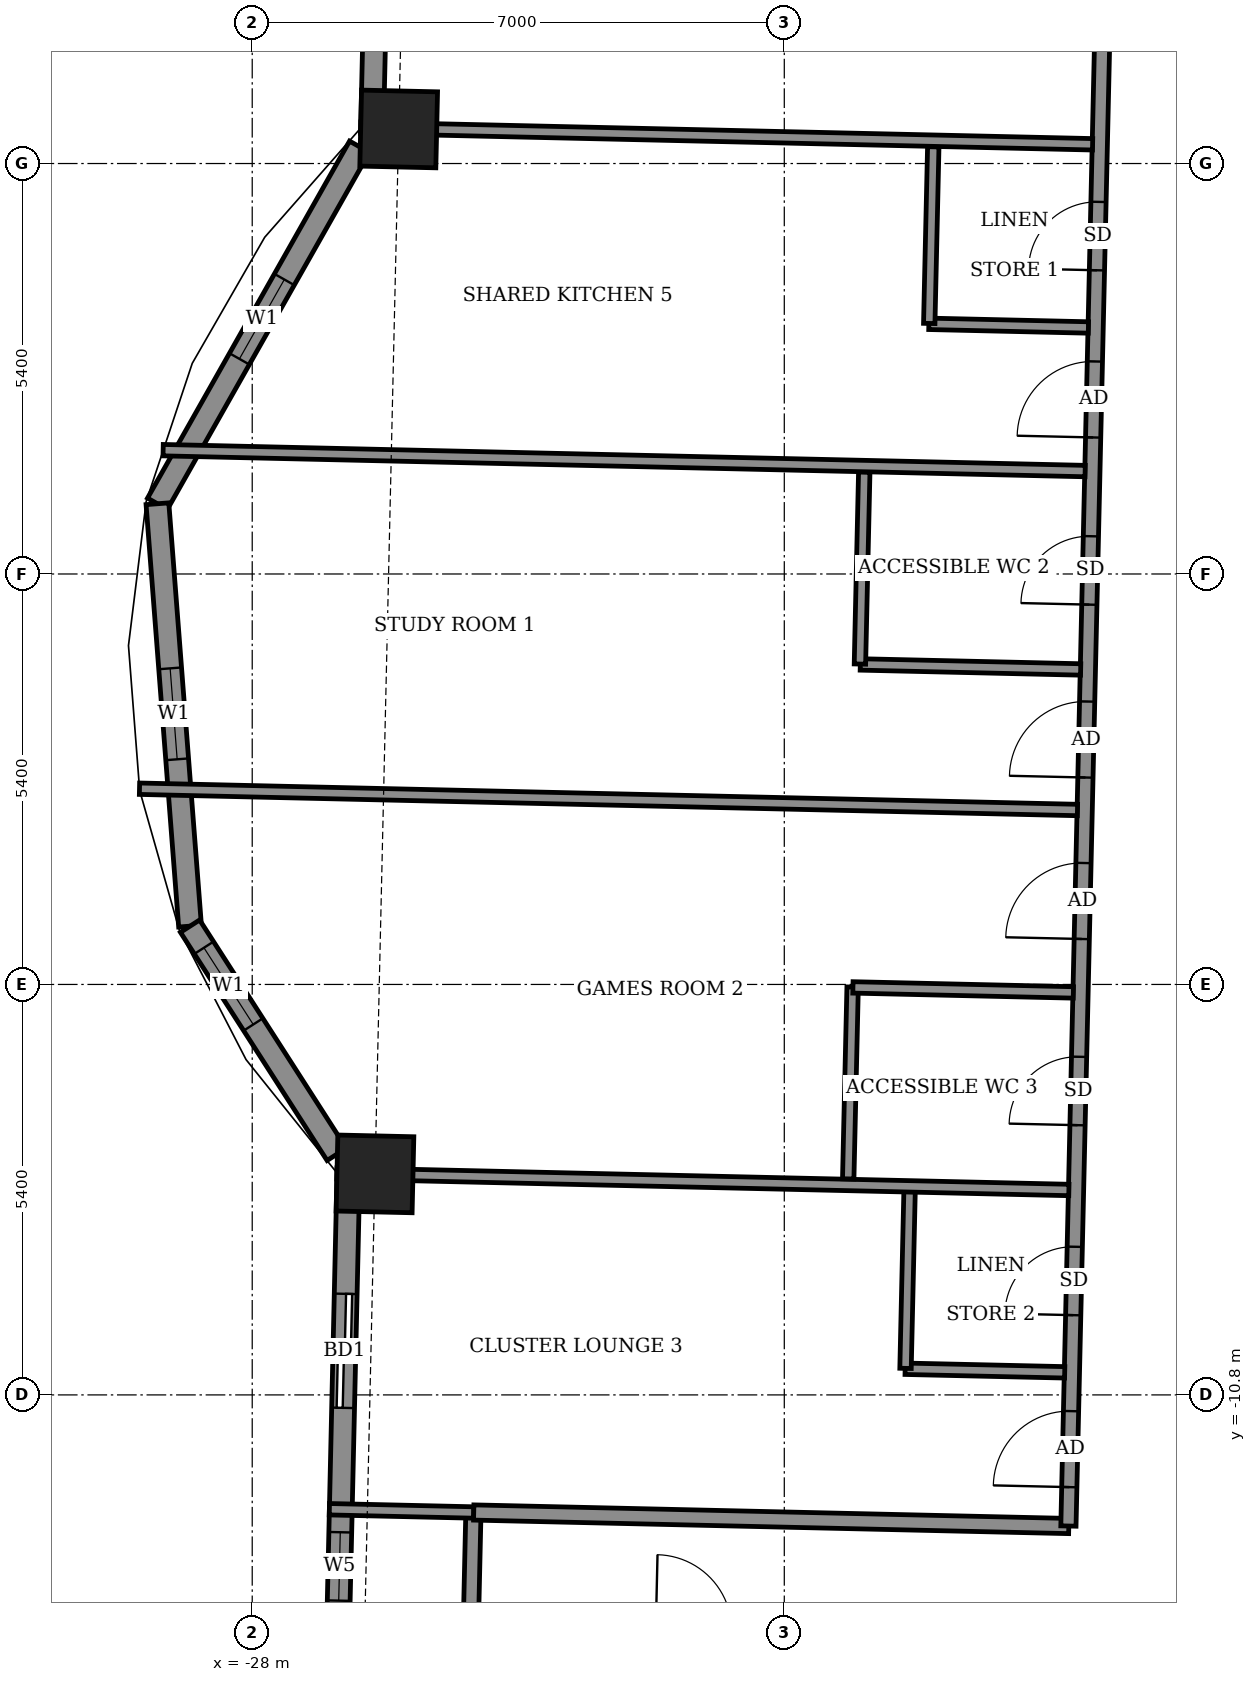
"""IFC4 building model, lengths in metres.
Left out: names, types, materials, properties, quantities, classifications, styles, units other than length and angle.
Written with IfcOpenShell. Run it as: python <this file> out.ifc"""

import sys

from ifc_helpers import new_model, si_unit, direction, frame, frame_2d, origin, origin_2d, place, context, subcontext, project, spatial, rectangle, extrude, element, fill, save


model = new_model("IFC4")
c1 = context("Model", 3, precision=1e-05, world=origin(), true_north=direction((0.0, 1.0)))
c2 = subcontext(c1, "Body", "Model", "MODEL_VIEW")
j1 = project(units=[si_unit("LENGTHUNIT", "METRE"), si_unit("PLANEANGLEUNIT", "RADIAN")], contexts=[c1])
p1 = place(None, origin())
s1 = spatial("IfcSite", under=j1, at=p1, CompositionType="ELEMENT")
p2 = place(p1, origin())
s2 = spatial("IfcBuilding", under=s1, at=p2, CompositionType="ELEMENT")
p3 = place(p2, frame((0.0, 0.0, 271.7)))
s3 = spatial("IfcBuildingStorey", under=s2, at=p3, CompositionType="ELEMENT", Elevation=271.7)
for number, where, z_axis, x_axis in (
    (1, (-26.385, -7.892, -0.55), (0.0, 0.0, 1.0), (-0.023, -1.0, 0.0)),
    (2, (-26.073, 5.855, -0.55), (0.0, 0.0, 1.0), (-0.023, -1.0, 0.0)),
):
    element("IfcColumn", number, at=place(p3, frame(where, z_axis=z_axis, x_axis=x_axis)), inside=s3, PredefinedType="COLUMN", context=c2, shape_type="SweptSolid", body=[
        extrude(rectangle(XDim=1.0, YDim=1.0, at=origin_2d()), origin(), (0.0, 0.0, 1.0), 3.6),
    ])
p4 = place(p3, frame((-26.108, 19.732, 0.0), z_axis=(0.0, 0.0, 1.0), x_axis=(-0.022700699365, -0.999742305921, 0.0)))
e3 = element("IfcWall", 3, at=p4, inside=s3, PredefinedType="SOLIDWALL", context=c2, shape_type="SweptSolid", body=[
    extrude(rectangle(XDim=13.927, YDim=0.3, at=frame_2d((6.964, 0.0))), origin(), (0.0, 0.0, 1.0), 2.55),
])
p5 = place(p4, frame((2.933, 0.0, 0.0)))
e4 = element("IfcOpeningElement", 4, at=p5, cuts=e3, PredefinedType="OPENING", context=c2, shape_type="SweptSolid", body=[
    extrude(rectangle(XDim=1.5, YDim=2.4, at=frame_2d((0.75, 1.2))), frame((0.0, 0.16, 0.0), z_axis=(0.0, -1.0, 0.0), x_axis=(1.0, 0.0, 0.0)), (0.0, 0.0, 1.0), 0.32),
])
p6 = place(p4, frame((9.216, 0.0, 0.9)))
e5 = element("IfcOpeningElement", 5, at=p6, cuts=e3, PredefinedType="OPENING", context=c2, shape_type="SweptSolid", body=[
    extrude(rectangle(XDim=2.4, YDim=1.5, at=frame_2d((1.2, 0.75))), frame((0.0, 0.16, 0.0), z_axis=(0.0, -1.0, 0.0), x_axis=(1.0, 0.0, 0.0)), (0.0, 0.0, 1.0), 0.32),
])
p7 = place(p3, frame((-26.589, 5.621, 0.0), z_axis=(0.0, 0.0, 1.0), x_axis=(-0.492495436053, -0.870315026566, 0.0)))
e6 = element("IfcWall", 6, at=p7, inside=s3, PredefinedType="SOLIDWALL", context=c2, shape_type="SweptSolid", body=[
    extrude(rectangle(XDim=5.397, YDim=0.3, at=frame_2d((2.698, 0.0))), origin(), (0.0, 0.0, 1.0), 3.05),
])
p8 = place(p7, frame((2.007, 0.0, 0.9)))
e7 = element("IfcOpeningElement", 7, at=p8, cuts=e6, PredefinedType="OPENING", context=c2, shape_type="SweptSolid", body=[
    extrude(rectangle(XDim=1.2, YDim=1.5, at=frame_2d((0.6, 0.75))), frame((0.0, 0.16, 0.0), z_axis=(0.0, -1.0, 0.0), x_axis=(1.0, 0.0, 0.0)), (0.0, 0.0, 1.0), 0.32),
])
p9 = place(p3, frame((-29.247, 0.924, 0.0), z_axis=(0.0, 0.0, 1.0), x_axis=(0.076961115238, -0.997034095075, 0.0)))
e8 = element("IfcWall", 8, at=p9, inside=s3, PredefinedType="SOLIDWALL", context=c2, shape_type="SweptSolid", body=[
    extrude(rectangle(XDim=5.574, YDim=0.3, at=frame_2d((2.787, 0.0))), origin(), (0.0, 0.0, 1.0), 3.05),
])
p10 = place(p9, frame((2.172, 0.0, 0.9)))
e9 = element("IfcOpeningElement", 9, at=p10, cuts=e8, PredefinedType="OPENING", context=c2, shape_type="SweptSolid", body=[
    extrude(rectangle(XDim=1.2, YDim=1.5, at=frame_2d((0.6, 0.75))), frame((0.0, 0.16, 0.0), z_axis=(0.0, -1.0, 0.0), x_axis=(1.0, 0.0, 0.0)), (0.0, 0.0, 1.0), 0.32),
])
p11 = place(p3, frame((-28.818, -4.633, 0.0), z_axis=(0.0, 0.0, 1.0), x_axis=(0.540633100578, -0.841258492117, 0.0)))
e10 = element("IfcWall", 10, at=p11, inside=s3, PredefinedType="SOLIDWALL", context=c2, shape_type="SweptSolid", body=[
    extrude(rectangle(XDim=3.568, YDim=0.3, at=frame_2d((1.784, 0.0))), origin(), (0.0, 0.0, 1.0), 3.05),
])
p12 = place(p11, frame((0.338, 0.0, 0.9)))
e11 = element("IfcOpeningElement", 11, at=p12, cuts=e10, PredefinedType="OPENING", context=c2, shape_type="SweptSolid", body=[
    extrude(rectangle(XDim=1.2, YDim=1.5, at=frame_2d((0.6, 0.75))), frame((0.0, 0.16, 0.0), z_axis=(0.0, -1.0, 0.0), x_axis=(1.0, 0.0, 0.0)), (0.0, 0.0, 1.0), 0.32),
])
p13 = place(p3, frame((-26.733, -7.829, 0.0), z_axis=(0.0, 0.0, 1.0), x_axis=(-0.022721405353, -0.999741835545, 0.0)))
e12 = element("IfcWall", 12, at=p13, inside=s3, PredefinedType="SOLIDWALL", context=c2, shape_type="SweptSolid", body=[
    extrude(rectangle(XDim=14.13, YDim=0.3, at=frame_2d((7.065, 0.0))), origin(), (0.0, 0.0, 1.0), 2.55),
])
p14 = place(p13, frame((1.642, 0.0, 0.0)))
e13 = element("IfcOpeningElement", 13, at=p14, cuts=e12, PredefinedType="OPENING", context=c2, shape_type="SweptSolid", body=[
    extrude(rectangle(XDim=1.5, YDim=2.4, at=frame_2d((0.75, 1.2))), frame((0.0, 0.16, 0.0), z_axis=(0.0, -1.0, 0.0), x_axis=(1.0, 0.0, 0.0)), (0.0, 0.0, 1.0), 0.32),
])
p15 = place(p13, frame((4.779, 0.0, 0.9)))
e14 = element("IfcOpeningElement", 14, at=p15, cuts=e12, PredefinedType="OPENING", context=c2, shape_type="SweptSolid", body=[
    extrude(rectangle(XDim=0.9, YDim=1.5, at=frame_2d((0.45, 0.75))), frame((0.0, 0.16, 0.0), z_axis=(0.0, -1.0, 0.0), x_axis=(1.0, 0.0, 0.0)), (0.0, 0.0, 1.0), 0.32),
])
p16 = place(p13, frame((9.304, 0.0, 0.9)))
e15 = element("IfcOpeningElement", 15, at=p16, cuts=e12, PredefinedType="OPENING", context=c2, shape_type="SweptSolid", body=[
    extrude(rectangle(XDim=2.4, YDim=1.5, at=frame_2d((1.2, 0.75))), frame((0.0, 0.16, 0.0), z_axis=(0.0, -1.0, 0.0), x_axis=(1.0, 0.0, 0.0)), (0.0, 0.0, 1.0), 0.32),
])
p17 = place(p3, frame((-25.124, -13.847, 0.0), z_axis=(0.0, 0.0, 1.0), x_axis=(0.022617910375, 0.999744182344, 0.0)))
e16 = element("IfcWall", 16, at=p17, inside=s3, PredefinedType="PARTITIONING", context=c2, shape_type="SweptSolid", body=[
    extrude(rectangle(XDim=1.5, YDim=0.2, at=frame_2d((0.75, 0.0))), origin(), (0.0, 0.0, 1.0), 3.05),
])
p18 = place(p3, frame((-26.985, -12.304, 0.0), z_axis=(0.0, 0.0, 1.0), x_axis=(0.999744152544, -0.022619227516, 0.0)))
e17 = element("IfcWall", 17, at=p18, inside=s3, PredefinedType="PARTITIONING", context=c2, shape_type="SweptSolid", body=[
    extrude(rectangle(XDim=1.9, YDim=0.15, at=frame_2d((0.95, 0.0))), origin(), (0.0, 0.0, 1.0), 2.5),
])
p19 = place(p3, frame((-25.086, -12.347, 0.0), z_axis=(0.0, 0.0, 1.0), x_axis=(0.999741690667, -0.022727779103, 0.0)))
e18 = element("IfcWall", 18, at=p19, inside=s3, PredefinedType="PARTITIONING", context=c2, shape_type="SweptSolid", body=[
    extrude(rectangle(XDim=7.831, YDim=0.2, at=frame_2d((3.916, 0.0))), origin(), (0.0, 0.0, 1.0), 3.05),
])
p20 = place(p3, frame((-17.262, -12.525, 0.0), z_axis=(0.0, 0.0, 1.0), x_axis=(0.022706151961, 0.999742182097, 0.0)))
e19 = element("IfcWall", 19, at=p20, inside=s3, PredefinedType="PARTITIONING", context=c2, shape_type="SweptSolid", body=[
    extrude(rectangle(XDim=25.45, YDim=0.2, at=frame_2d((12.725, 0.0))), origin(), (0.0, 0.0, 1.0), 3.05),
])
p21 = place(p20, frame((19.913, 0.0, 0.0)))
e20 = element("IfcOpeningElement", 20, at=p21, cuts=e19, PredefinedType="OPENING", context=c2, shape_type="SweptSolid", body=[
    extrude(rectangle(XDim=1.0, YDim=2.1, at=frame_2d((0.5, 1.05))), frame((0.0, 0.11, 0.0), z_axis=(0.0, -1.0, 0.0), x_axis=(1.0, 0.0, 0.0)), (0.0, 0.0, 1.0), 0.22),
])
p22 = place(p20, frame((23.6, 0.0, 0.0)))
e21 = element("IfcOpeningElement", 21, at=p22, cuts=e19, PredefinedType="OPENING", context=c2, shape_type="SweptSolid", body=[
    extrude(rectangle(XDim=0.9, YDim=2.1, at=frame_2d((0.45, 1.05))), frame((0.0, 0.11, 0.0), z_axis=(0.0, -1.0, 0.0), x_axis=(1.0, 0.0, 0.0)), (0.0, 0.0, 1.0), 0.22),
])
p23 = place(p20, frame((14.325, 0.0, 0.0)))
e22 = element("IfcOpeningElement", 22, at=p23, cuts=e19, PredefinedType="OPENING", context=c2, shape_type="SweptSolid", body=[
    extrude(rectangle(XDim=1.0, YDim=2.1, at=frame_2d((0.5, 1.05))), frame((0.0, 0.11, 0.0), z_axis=(0.0, -1.0, 0.0), x_axis=(1.0, 0.0, 0.0)), (0.0, 0.0, 1.0), 0.22),
])
p24 = place(p20, frame((16.525, 0.0, 0.0)))
e23 = element("IfcOpeningElement", 23, at=p24, cuts=e19, PredefinedType="OPENING", context=c2, shape_type="SweptSolid", body=[
    extrude(rectangle(XDim=0.9, YDim=2.1, at=frame_2d((0.45, 1.05))), frame((0.0, 0.11, 0.0), z_axis=(0.0, -1.0, 0.0), x_axis=(1.0, 0.0, 0.0)), (0.0, 0.0, 1.0), 0.22),
])
p25 = place(p20, frame((9.85, 0.0, 0.0)))
e24 = element("IfcOpeningElement", 24, at=p25, cuts=e19, PredefinedType="OPENING", context=c2, shape_type="SweptSolid", body=[
    extrude(rectangle(XDim=1.0, YDim=2.1, at=frame_2d((0.5, 1.05))), frame((0.0, 0.11, 0.0), z_axis=(0.0, -1.0, 0.0), x_axis=(1.0, 0.0, 0.0)), (0.0, 0.0, 1.0), 0.22),
])
p26 = place(p20, frame((12.125, 0.0, 0.0)))
e25 = element("IfcOpeningElement", 25, at=p26, cuts=e19, PredefinedType="OPENING", context=c2, shape_type="SweptSolid", body=[
    extrude(rectangle(XDim=0.9, YDim=2.1, at=frame_2d((0.45, 1.05))), frame((0.0, 0.11, 0.0), z_axis=(0.0, -1.0, 0.0), x_axis=(1.0, 0.0, 0.0)), (0.0, 0.0, 1.0), 0.22),
])
p27 = place(p20, frame((7.725, 0.0, 0.0)))
e26 = element("IfcOpeningElement", 26, at=p27, cuts=e19, PredefinedType="OPENING", context=c2, shape_type="SweptSolid", body=[
    extrude(rectangle(XDim=1.0, YDim=2.1, at=frame_2d((0.5, 1.05))), frame((0.0, 0.11, 0.0), z_axis=(0.0, -1.0, 0.0), x_axis=(1.0, 0.0, 0.0)), (0.0, 0.0, 1.0), 0.22),
])
p28 = place(p20, frame((5.275, 0.0, 0.0)))
e27 = element("IfcOpeningElement", 27, at=p28, cuts=e19, PredefinedType="OPENING", context=c2, shape_type="SweptSolid", body=[
    extrude(rectangle(XDim=0.9, YDim=2.1, at=frame_2d((0.45, 1.05))), frame((0.0, 0.11, 0.0), z_axis=(0.0, -1.0, 0.0), x_axis=(1.0, 0.0, 0.0)), (0.0, 0.0, 1.0), 0.22),
])
p29 = place(p20, frame((0.512, 0.0, 0.0)))
e28 = element("IfcOpeningElement", 28, at=p29, cuts=e19, PredefinedType="OPENING", context=c2, shape_type="SweptSolid", body=[
    extrude(rectangle(XDim=1.0, YDim=2.1, at=frame_2d((0.5, 1.05))), frame((0.0, 0.11, 0.0), z_axis=(0.0, -1.0, 0.0), x_axis=(1.0, 0.0, 0.0)), (0.0, 0.0, 1.0), 0.22),
])
p30 = place(p20, frame((2.775, 0.0, 0.0)))
e29 = element("IfcOpeningElement", 29, at=p30, cuts=e19, PredefinedType="OPENING", context=c2, shape_type="SweptSolid", body=[
    extrude(rectangle(XDim=0.9, YDim=2.1, at=frame_2d((0.45, 1.05))), frame((0.0, 0.11, 0.0), z_axis=(0.0, -1.0, 0.0), x_axis=(1.0, 0.0, 0.0)), (0.0, 0.0, 1.0), 0.22),
])
p31 = place(p3, frame((-19.41, -10.456, 0.0), z_axis=(0.0, 0.0, 1.0), x_axis=(0.999750703499, -0.022327804475, 0.0)))
e30 = element("IfcWall", 30, at=p31, inside=s3, PredefinedType="PARTITIONING", context=c2, shape_type="SweptSolid", body=[
    extrude(rectangle(XDim=2.099, YDim=0.15, at=frame_2d((1.05, 0.0))), origin(), (0.0, 0.0, 1.0), 3.05),
])
p32 = place(p3, frame((-19.405, -10.451, 0.0), z_axis=(0.0, 0.0, 1.0), x_axis=(0.022781023197, 0.999740478815, 0.0)))
e31 = element("IfcWall", 31, at=p32, inside=s3, PredefinedType="PARTITIONING", context=c2, shape_type="SweptSolid", body=[
    extrude(rectangle(XDim=2.325, YDim=0.15, at=frame_2d((1.163, 0.0))), origin(), (0.0, 0.0, 1.0), 3.05),
])
p33 = place(p3, frame((-26.885, -7.885, 0.0), z_axis=(0.0, 0.0, 1.0), x_axis=(0.999741468995, -0.022737527832, 0.0)))
e32 = element("IfcWall", 32, at=p33, inside=s3, PredefinedType="PARTITIONING", context=c2, shape_type="SweptSolid", body=[
    extrude(rectangle(XDim=9.631, YDim=0.15, at=frame_2d((4.816, 0.0))), origin(), (0.0, 0.0, 1.0), 3.05),
])
p34 = place(p3, frame((-20.159, -7.958, 0.0), z_axis=(0.0, 0.0, 1.0), x_axis=(0.022919108675, 0.999737322729, 0.0)))
e33 = element("IfcWall", 33, at=p34, inside=s3, PredefinedType="PARTITIONING", context=c2, shape_type="SweptSolid", body=[
    extrude(rectangle(XDim=2.525, YDim=0.15, at=frame_2d((1.262, 0.0))), origin(), (0.0, 0.0, 1.0), 3.05),
])
p35 = place(p3, frame((-20.097, -5.439, 0.0), z_axis=(0.0, 0.0, 1.0), x_axis=(0.999741748633, -0.022725229174, 0.0)))
e34 = element("IfcWall", 34, at=p35, inside=s3, PredefinedType="PARTITIONING", context=c2, shape_type="SweptSolid", body=[
    extrude(rectangle(XDim=2.901, YDim=0.15, at=frame_2d((1.45, 0.0))), origin(), (0.0, 0.0, 1.0), 3.05),
])
p36 = place(p3, frame((-29.483, -2.825, 0.0), z_axis=(0.0, 0.0, 1.0), x_axis=(0.999742611035, -0.022687258129, 0.0)))
e35 = element("IfcWall", 35, at=p36, inside=s3, PredefinedType="PARTITIONING", context=c2, shape_type="SweptSolid", body=[
    extrude(rectangle(XDim=12.343, YDim=0.15, at=frame_2d((6.171, 0.0))), origin(), (0.0, 0.0, 1.0), 2.05),
])
p37 = place(p3, frame((-20.0, -1.19, 0.0), z_axis=(0.0, 0.0, 1.0), x_axis=(0.999739657619, -0.022817032779, 0.0)))
e36 = element("IfcWall", 36, at=p37, inside=s3, PredefinedType="PARTITIONING", context=c2, shape_type="SweptSolid", body=[
    extrude(rectangle(XDim=2.9, YDim=0.15, at=frame_2d((1.45, 0.0))), origin(), (0.0, 0.0, 1.0), 3.05),
])
p38 = place(p3, frame((-20.005, -1.185, 0.0), z_axis=(0.0, 0.0, 1.0), x_axis=(0.022521599255, 0.999746356616, 0.0)))
e37 = element("IfcWall", 37, at=p38, inside=s3, PredefinedType="PARTITIONING", context=c2, shape_type="SweptSolid", body=[
    extrude(rectangle(XDim=2.526, YDim=0.15, at=frame_2d((1.263, 0.0))), origin(), (0.0, 0.0, 1.0), 3.05),
])
p39 = place(p3, frame((-29.172, 1.629, 0.0), z_axis=(0.0, 0.0, 1.0), x_axis=(0.999743298181, -0.02265695791, 0.0)))
e38 = element("IfcWall", 38, at=p39, inside=s3, PredefinedType="PARTITIONING", context=c2, shape_type="SweptSolid", body=[
    extrude(rectangle(XDim=12.133, YDim=0.15, at=frame_2d((6.067, 0.0))), origin(), (0.0, 0.0, 1.0), 2.05),
])
p40 = place(p3, frame((-19.098, 3.291, 0.0), z_axis=(0.0, 0.0, 1.0), x_axis=(0.999737555419, -0.022908956429, 0.0)))
e39 = element("IfcWall", 39, at=p40, inside=s3, PredefinedType="PARTITIONING", context=c2, shape_type="SweptSolid", body=[
    extrude(rectangle(XDim=2.099, YDim=0.15, at=frame_2d((1.05, 0.0))), origin(), (0.0, 0.0, 1.0), 3.05),
])
p41 = place(p3, frame((-19.093, 3.296, 0.0), z_axis=(0.0, 0.0, 1.0), x_axis=(0.022788198363, 0.99974031529, 0.0)))
e40 = element("IfcWall", 40, at=p41, inside=s3, PredefinedType="PARTITIONING", context=c2, shape_type="SweptSolid", body=[
    extrude(rectangle(XDim=2.325, YDim=0.15, at=frame_2d((1.162, 0.0))), origin(), (0.0, 0.0, 1.0), 3.05),
])
p42 = place(p3, frame((-26.573, 5.871, 0.0), z_axis=(0.0, 0.0, 1.0), x_axis=(0.999743768709, -0.022636186244, 0.0)))
e41 = element("IfcWall", 41, at=p42, inside=s3, PredefinedType="PARTITIONING", context=c2, shape_type="SweptSolid", body=[
    extrude(rectangle(XDim=9.631, YDim=0.15, at=frame_2d((4.816, 0.0))), origin(), (0.0, 0.0, 1.0), 3.05),
])
p43 = place(p8, origin())
e42 = element("IfcWindow", 42, at=p43, inside=s3, PartitioningType="SINGLE_PANEL", PredefinedType="WINDOW", context=c2, shape_type="SweptSolid", body=[
    extrude(rectangle(XDim=1.2, YDim=1.5, at=frame_2d((0.6, 0.75))), frame((0.0, 0.03, 0.0), z_axis=(0.0, -1.0, 0.0), x_axis=(1.0, 0.0, 0.0)), (0.0, 0.0, 1.0), 0.06),
])
fill(e7, e42)
p44 = place(p10, origin())
e43 = element("IfcWindow", 43, at=p44, inside=s3, PartitioningType="SINGLE_PANEL", PredefinedType="WINDOW", context=c2, shape_type="SweptSolid", body=[
    extrude(rectangle(XDim=1.2, YDim=1.5, at=frame_2d((0.6, 0.75))), frame((0.0, 0.03, 0.0), z_axis=(0.0, -1.0, 0.0), x_axis=(1.0, 0.0, 0.0)), (0.0, 0.0, 1.0), 0.06),
])
fill(e9, e43)
p45 = place(p12, origin())
e44 = element("IfcWindow", 44, at=p45, inside=s3, PartitioningType="SINGLE_PANEL", PredefinedType="WINDOW", context=c2, shape_type="SweptSolid", body=[
    extrude(rectangle(XDim=1.2, YDim=1.5, at=frame_2d((0.6, 0.75))), frame((0.0, 0.03, 0.0), z_axis=(0.0, -1.0, 0.0), x_axis=(1.0, 0.0, 0.0)), (0.0, 0.0, 1.0), 0.06),
])
fill(e11, e44)
p46 = place(p14, origin())
e45 = element("IfcDoor", 45, at=p46, inside=s3, OperationType="SLIDING_TO_LEFT", PredefinedType="DOOR", context=c2, shape_type="SweptSolid", body=[
    extrude(rectangle(XDim=1.5, YDim=2.4, at=frame_2d((0.75, 1.2))), frame((0.0, 0.025, 0.0), z_axis=(0.0, -1.0, 0.0), x_axis=(1.0, 0.0, 0.0)), (0.0, 0.0, 1.0), 0.05),
])
fill(e13, e45)
p47 = place(p15, origin())
e46 = element("IfcWindow", 46, at=p47, inside=s3, PartitioningType="SINGLE_PANEL", PredefinedType="WINDOW", context=c2, shape_type="SweptSolid", body=[
    extrude(rectangle(XDim=0.9, YDim=1.5, at=frame_2d((0.45, 0.75))), frame((0.0, 0.03, 0.0), z_axis=(0.0, -1.0, 0.0), x_axis=(1.0, 0.0, 0.0)), (0.0, 0.0, 1.0), 0.06),
])
fill(e14, e46)
p48 = place(p23, origin())
e47 = element("IfcDoor", 47, at=p48, inside=s3, OperationType="SINGLE_SWING_RIGHT", PredefinedType="DOOR", context=c2, shape_type="SweptSolid", body=[
    extrude(rectangle(XDim=1.0, YDim=2.1, at=frame_2d((0.5, 1.05))), frame((0.0, 0.025, 0.0), z_axis=(0.0, -1.0, 0.0), x_axis=(1.0, 0.0, 0.0)), (0.0, 0.0, 1.0), 0.05),
])
fill(e22, e47)
p49 = place(p24, origin())
e48 = element("IfcDoor", 48, at=p49, inside=s3, OperationType="SINGLE_SWING_RIGHT", PredefinedType="DOOR", context=c2, shape_type="SweptSolid", body=[
    extrude(rectangle(XDim=0.9, YDim=2.1, at=frame_2d((0.45, 1.05))), frame((0.0, 0.025, 0.0), z_axis=(0.0, -1.0, 0.0), x_axis=(1.0, 0.0, 0.0)), (0.0, 0.0, 1.0), 0.05),
])
fill(e23, e48)
p50 = place(p25, origin())
e49 = element("IfcDoor", 49, at=p50, inside=s3, OperationType="SINGLE_SWING_LEFT", PredefinedType="DOOR", context=c2, shape_type="SweptSolid", body=[
    extrude(rectangle(XDim=1.0, YDim=2.1, at=frame_2d((0.5, 1.05))), frame((0.0, 0.025, 0.0), z_axis=(0.0, -1.0, 0.0), x_axis=(1.0, 0.0, 0.0)), (0.0, 0.0, 1.0), 0.05),
])
fill(e24, e49)
p51 = place(p26, origin())
e50 = element("IfcDoor", 50, at=p51, inside=s3, OperationType="SINGLE_SWING_LEFT", PredefinedType="DOOR", context=c2, shape_type="SweptSolid", body=[
    extrude(rectangle(XDim=0.9, YDim=2.1, at=frame_2d((0.45, 1.05))), frame((0.0, 0.025, 0.0), z_axis=(0.0, -1.0, 0.0), x_axis=(1.0, 0.0, 0.0)), (0.0, 0.0, 1.0), 0.05),
])
fill(e25, e50)
p52 = place(p27, origin())
e51 = element("IfcDoor", 51, at=p52, inside=s3, OperationType="SINGLE_SWING_RIGHT", PredefinedType="DOOR", context=c2, shape_type="SweptSolid", body=[
    extrude(rectangle(XDim=1.0, YDim=2.1, at=frame_2d((0.5, 1.05))), frame((0.0, 0.025, 0.0), z_axis=(0.0, -1.0, 0.0), x_axis=(1.0, 0.0, 0.0)), (0.0, 0.0, 1.0), 0.05),
])
fill(e26, e51)
p53 = place(p28, origin())
e52 = element("IfcDoor", 52, at=p53, inside=s3, OperationType="SINGLE_SWING_RIGHT", PredefinedType="DOOR", context=c2, shape_type="SweptSolid", body=[
    extrude(rectangle(XDim=0.9, YDim=2.1, at=frame_2d((0.45, 1.05))), frame((0.0, 0.025, 0.0), z_axis=(0.0, -1.0, 0.0), x_axis=(1.0, 0.0, 0.0)), (0.0, 0.0, 1.0), 0.05),
])
fill(e27, e52)
p54 = place(p29, origin())
e53 = element("IfcDoor", 53, at=p54, inside=s3, OperationType="SINGLE_SWING_LEFT", PredefinedType="DOOR", context=c2, shape_type="SweptSolid", body=[
    extrude(rectangle(XDim=1.0, YDim=2.1, at=frame_2d((0.5, 1.05))), frame((0.0, 0.025, 0.0), z_axis=(0.0, -1.0, 0.0), x_axis=(1.0, 0.0, 0.0)), (0.0, 0.0, 1.0), 0.05),
])
fill(e28, e53)
p55 = place(p30, origin())
e54 = element("IfcDoor", 54, at=p55, inside=s3, OperationType="SINGLE_SWING_LEFT", PredefinedType="DOOR", context=c2, shape_type="SweptSolid", body=[
    extrude(rectangle(XDim=0.9, YDim=2.1, at=frame_2d((0.45, 1.05))), frame((0.0, 0.025, 0.0), z_axis=(0.0, -1.0, 0.0), x_axis=(1.0, 0.0, 0.0)), (0.0, 0.0, 1.0), 0.05),
])
fill(e29, e54)
save(model, sys.argv[1])
